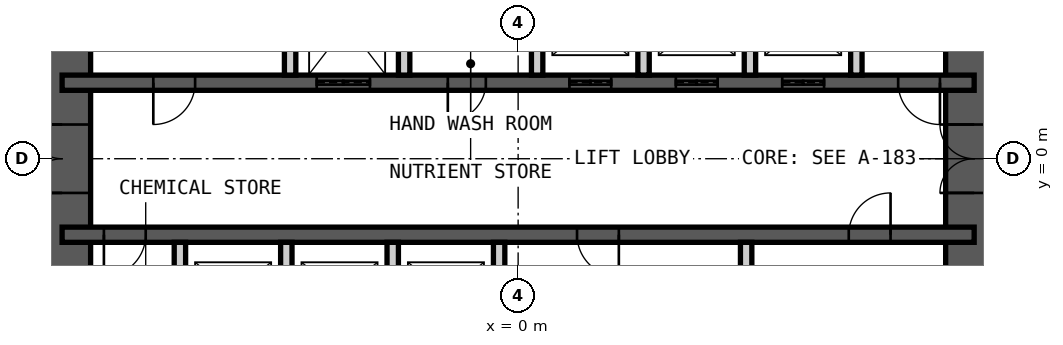
"""IFC4 building model, lengths in metres.
Left out: names, types, materials, properties, quantities, classifications, styles, units other than length and angle.
Written with IfcOpenShell. Run it as: python <this file> out.ifc"""

import sys

from ifc_helpers import new_model, si_unit, direction, frame, frame_2d, origin, place, context, subcontext, project, spatial, rectangle, extrude, element, fill, save


model = new_model("IFC4")
c1 = context("Model", 3, precision=1e-05, world=origin(), true_north=direction((0.0, 1.0)))
c2 = subcontext(c1, "Body", "Model", "MODEL_VIEW")
j1 = project(units=[si_unit("LENGTHUNIT", "METRE"), si_unit("PLANEANGLEUNIT", "RADIAN")], contexts=[c1])
p1 = place(None, origin())
s1 = spatial("IfcSite", under=j1, at=p1, CompositionType="ELEMENT")
p2 = place(p1, origin())
s2 = spatial("IfcBuilding", under=s1, at=p2, CompositionType="ELEMENT")
p3 = place(p2, frame((0.0, 0.0, 77.0)))
s3 = spatial("IfcBuildingStorey", under=s2, at=p3, CompositionType="ELEMENT", Elevation=77.0)
p4 = place(p3, frame((12.0, -9.0, 0.0), z_axis=(0.0, 0.0, 1.0), x_axis=(0.0, 1.0, 0.0)))
e1 = element("IfcWall", 1, at=p4, inside=s3, PredefinedType="SHEAR", context=c2, shape_type="SweptSolid", body=[
    extrude(rectangle(XDim=18.0, YDim=1.5, at=frame_2d((9.0, 0.0))), origin(), (0.0, 0.0, 1.0), 5.0),
])
p5 = place(p4, frame((8.1, 0.0, 0.0)))
e2 = element("IfcOpeningElement", 2, at=p5, cuts=e1, PredefinedType="OPENING", context=c2, shape_type="SweptSolid", body=[
    extrude(rectangle(XDim=1.8, YDim=2.1, at=frame_2d((0.9, 1.05))), frame((0.0, 0.76, 0.0), z_axis=(0.0, -1.0, 0.0), x_axis=(1.0, 0.0, 0.0)), (0.0, 0.0, 1.0), 1.52),
])
p6 = place(p3, frame((-12.0, -9.0, 0.0), z_axis=(0.0, 0.0, 1.0), x_axis=(0.0, 1.0, 0.0)))
e3 = element("IfcWall", 3, at=p6, inside=s3, PredefinedType="SHEAR", context=c2, shape_type="SweptSolid", body=[
    extrude(rectangle(XDim=18.0, YDim=1.5, at=frame_2d((9.0, 0.0))), origin(), (0.0, 0.0, 1.0), 5.0),
])
p7 = place(p6, frame((8.1, 0.0, 0.0)))
e4 = element("IfcOpeningElement", 4, at=p7, cuts=e3, PredefinedType="OPENING", context=c2, shape_type="SweptSolid", body=[
    extrude(rectangle(XDim=1.8, YDim=2.1, at=frame_2d((0.9, 1.05))), frame((0.0, 0.76, 0.0), z_axis=(0.0, -1.0, 0.0), x_axis=(1.0, 0.0, 0.0)), (0.0, 0.0, 1.0), 1.52),
])
p8 = place(p3, frame((-12.0, 2.0, 0.0), z_axis=(0.0, 0.0, 1.0), x_axis=(1.0, 0.0, 0.0)))
e5 = element("IfcWall", 5, at=p8, inside=s3, PredefinedType="SHEAR", context=c2, shape_type="SweptSolid", body=[
    extrude(rectangle(XDim=24.0, YDim=0.4, at=frame_2d((12.0, 0.0))), origin(), (0.0, 0.0, 1.0), 5.0),
])
p9 = place(p8, frame((2.4, 0.0, 0.0)))
e6 = element("IfcOpeningElement", 6, at=p9, cuts=e5, PredefinedType="OPENING", context=c2, shape_type="SweptSolid", body=[
    extrude(rectangle(XDim=1.1, YDim=2.1, at=frame_2d((0.55, 1.05))), frame((0.0, 0.21, 0.0), z_axis=(0.0, -1.0, 0.0), x_axis=(1.0, 0.0, 0.0)), (0.0, 0.0, 1.0), 0.42),
])
p10 = place(p8, frame((22.0, 0.0, 0.0)))
e7 = element("IfcOpeningElement", 7, at=p10, cuts=e5, PredefinedType="OPENING", context=c2, shape_type="SweptSolid", body=[
    extrude(rectangle(XDim=1.1, YDim=2.1, at=frame_2d((0.55, 1.05))), frame((0.0, 0.21, 0.0), z_axis=(0.0, -1.0, 0.0), x_axis=(1.0, 0.0, 0.0)), (0.0, 0.0, 1.0), 0.42),
])
p11 = place(p8, frame((10.15, 0.0, 0.0)))
e8 = element("IfcOpeningElement", 8, at=p11, cuts=e5, PredefinedType="OPENING", context=c2, shape_type="SweptSolid", body=[
    extrude(rectangle(XDim=1.0, YDim=2.1, at=frame_2d((0.5, 1.05))), frame((0.0, 0.21, 0.0), z_axis=(0.0, -1.0, 0.0), x_axis=(1.0, 0.0, 0.0)), (0.0, 0.0, 1.0), 0.42),
])
p12 = place(p8, frame((6.7, 0.0, 0.0)))
e9 = element("IfcOpeningElement", 9, at=p12, cuts=e5, PredefinedType="OPENING", context=c2, shape_type="SweptSolid", body=[
    extrude(rectangle(XDim=1.4, YDim=2.4, at=frame_2d((0.7, 1.2))), frame((0.0, 0.21, 0.0), z_axis=(0.0, -1.0, 0.0), x_axis=(1.0, 0.0, 0.0)), (0.0, 0.0, 1.0), 0.42),
])
p13 = place(p8, frame((13.35, 0.0, 0.0)))
e10 = element("IfcOpeningElement", 10, at=p13, cuts=e5, PredefinedType="OPENING", context=c2, shape_type="SweptSolid", body=[
    extrude(rectangle(XDim=1.1, YDim=2.4, at=frame_2d((0.55, 1.2))), frame((0.0, 0.21, 0.0), z_axis=(0.0, -1.0, 0.0), x_axis=(1.0, 0.0, 0.0)), (0.0, 0.0, 1.0), 0.42),
])
p14 = place(p8, frame((16.15, 0.0, 0.0)))
e11 = element("IfcOpeningElement", 11, at=p14, cuts=e5, PredefinedType="OPENING", context=c2, shape_type="SweptSolid", body=[
    extrude(rectangle(XDim=1.1, YDim=2.4, at=frame_2d((0.55, 1.2))), frame((0.0, 0.21, 0.0), z_axis=(0.0, -1.0, 0.0), x_axis=(1.0, 0.0, 0.0)), (0.0, 0.0, 1.0), 0.42),
])
p15 = place(p8, frame((18.95, 0.0, 0.0)))
e12 = element("IfcOpeningElement", 12, at=p15, cuts=e5, PredefinedType="OPENING", context=c2, shape_type="SweptSolid", body=[
    extrude(rectangle(XDim=1.1, YDim=2.4, at=frame_2d((0.55, 1.2))), frame((0.0, 0.21, 0.0), z_axis=(0.0, -1.0, 0.0), x_axis=(1.0, 0.0, 0.0)), (0.0, 0.0, 1.0), 0.42),
])
p16 = place(p3, frame((-12.0, -2.0, 0.0), z_axis=(0.0, 0.0, 1.0), x_axis=(1.0, 0.0, 0.0)))
e13 = element("IfcWall", 13, at=p16, inside=s3, PredefinedType="SHEAR", context=c2, shape_type="SweptSolid", body=[
    extrude(rectangle(XDim=24.0, YDim=0.4, at=frame_2d((12.0, 0.0))), origin(), (0.0, 0.0, 1.0), 5.0),
])
p17 = place(p16, frame((1.1, 0.0, 0.0)))
e14 = element("IfcOpeningElement", 14, at=p17, cuts=e13, PredefinedType="OPENING", context=c2, shape_type="SweptSolid", body=[
    extrude(rectangle(XDim=1.1, YDim=2.1, at=frame_2d((0.55, 1.05))), frame((0.0, 0.21, 0.0), z_axis=(0.0, -1.0, 0.0), x_axis=(1.0, 0.0, 0.0)), (0.0, 0.0, 1.0), 0.42),
])
p18 = place(p16, frame((13.55, 0.0, 0.0)))
e15 = element("IfcOpeningElement", 15, at=p18, cuts=e13, PredefinedType="OPENING", context=c2, shape_type="SweptSolid", body=[
    extrude(rectangle(XDim=1.1, YDim=2.1, at=frame_2d((0.55, 1.05))), frame((0.0, 0.21, 0.0), z_axis=(0.0, -1.0, 0.0), x_axis=(1.0, 0.0, 0.0)), (0.0, 0.0, 1.0), 0.42),
])
p19 = place(p16, frame((20.7, 0.0, 0.0)))
e16 = element("IfcOpeningElement", 16, at=p19, cuts=e13, PredefinedType="OPENING", context=c2, shape_type="SweptSolid", body=[
    extrude(rectangle(XDim=1.1, YDim=2.1, at=frame_2d((0.55, 1.05))), frame((0.0, 0.21, 0.0), z_axis=(0.0, -1.0, 0.0), x_axis=(1.0, 0.0, 0.0)), (0.0, 0.0, 1.0), 0.42),
])
for number, where, z_axis, x_axis in (
    (17, (-6.0, 2.2, 0.0), (0.0, 0.0, 1.0), (0.0, 1.0, 0.0)),
    (18, (-3.0, 2.2, 0.0), (0.0, 0.0, 1.0), (0.0, 1.0, 0.0)),
    (19, (0.5, 2.2, 0.0), (0.0, 0.0, 1.0), (0.0, 1.0, 0.0)),
    (20, (3.3, 2.2, 0.0), (0.0, 0.0, 1.0), (0.0, 1.0, 0.0)),
    (21, (6.1, 2.2, 0.0), (0.0, 0.0, 1.0), (0.0, 1.0, 0.0)),
    (22, (8.9, 2.2, 0.0), (0.0, 0.0, 1.0), (0.0, 1.0, 0.0)),
    (23, (-8.9, -4.85, 0.0), (0.0, 0.0, 1.0), (0.0, 1.0, 0.0)),
    (24, (-6.1, -4.85, 0.0), (0.0, 0.0, 1.0), (0.0, 1.0, 0.0)),
    (25, (-3.3, -4.85, 0.0), (0.0, 0.0, 1.0), (0.0, 1.0, 0.0)),
    (26, (-0.5, -4.85, 0.0), (0.0, 0.0, 1.0), (0.0, 1.0, 0.0)),
    (27, (6.0, -4.85, 0.0), (0.0, 0.0, 1.0), (0.0, 1.0, 0.0)),
):
    element("IfcWall", number, at=place(p3, frame(where, z_axis=z_axis, x_axis=x_axis)), inside=s3, PredefinedType="PARTITIONING", context=c2, shape_type="SweptSolid", body=[
        extrude(rectangle(XDim=2.65, YDim=0.3, at=frame_2d((1.325, 0.0))), origin(), (0.0, 0.0, 1.0), 4.78),
    ])
p20 = place(p9, origin())
e28 = element("IfcDoor", 28, at=p20, inside=s3, OperationType="SINGLE_SWING_LEFT", PredefinedType="DOOR", context=c2, shape_type="SweptSolid", body=[
    extrude(rectangle(XDim=1.1, YDim=2.1, at=frame_2d((0.55, 1.05))), frame((0.0, 0.025, 0.0), z_axis=(0.0, -1.0, 0.0), x_axis=(1.0, 0.0, 0.0)), (0.0, 0.0, 1.0), 0.05),
])
fill(e6, e28)
p21 = place(p17, origin())
e29 = element("IfcDoor", 29, at=p21, inside=s3, OperationType="SINGLE_SWING_LEFT", PredefinedType="DOOR", context=c2, shape_type="SweptSolid", body=[
    extrude(rectangle(XDim=1.1, YDim=2.1, at=frame_2d((0.55, 1.05))), frame((0.0, 0.025, 0.0), z_axis=(0.0, -1.0, 0.0), x_axis=(1.0, 0.0, 0.0)), (0.0, 0.0, 1.0), 0.05),
])
fill(e14, e29)
p22 = place(p10, origin())
e30 = element("IfcDoor", 30, at=p22, inside=s3, OperationType="SINGLE_SWING_RIGHT", PredefinedType="DOOR", context=c2, shape_type="SweptSolid", body=[
    extrude(rectangle(XDim=1.1, YDim=2.1, at=frame_2d((0.55, 1.05))), frame((0.0, 0.025, 0.0), z_axis=(0.0, -1.0, 0.0), x_axis=(1.0, 0.0, 0.0)), (0.0, 0.0, 1.0), 0.05),
])
fill(e7, e30)
p23 = place(p11, origin())
e31 = element("IfcDoor", 31, at=p23, inside=s3, OperationType="SINGLE_SWING_LEFT", PredefinedType="DOOR", context=c2, shape_type="SweptSolid", body=[
    extrude(rectangle(XDim=1.0, YDim=2.1, at=frame_2d((0.5, 1.05))), frame((0.0, 0.025, 0.0), z_axis=(0.0, -1.0, 0.0), x_axis=(1.0, 0.0, 0.0)), (0.0, 0.0, 1.0), 0.05),
])
fill(e8, e31)
p24 = place(p18, origin())
e32 = element("IfcDoor", 32, at=p24, inside=s3, OperationType="SINGLE_SWING_RIGHT", PredefinedType="DOOR", context=c2, shape_type="SweptSolid", body=[
    extrude(rectangle(XDim=1.1, YDim=2.1, at=frame_2d((0.55, 1.05))), frame((0.0, 0.025, 0.0), z_axis=(0.0, -1.0, 0.0), x_axis=(1.0, 0.0, 0.0)), (0.0, 0.0, 1.0), 0.05),
])
fill(e15, e32)
p25 = place(p19, origin())
e33 = element("IfcDoor", 33, at=p25, inside=s3, OperationType="SINGLE_SWING_LEFT", PredefinedType="DOOR", context=c2, shape_type="SweptSolid", body=[
    extrude(rectangle(XDim=1.1, YDim=2.1, at=frame_2d((0.55, 1.05))), frame((0.0, 0.025, 0.0), z_axis=(0.0, -1.0, 0.0), x_axis=(1.0, 0.0, 0.0)), (0.0, 0.0, 1.0), 0.05),
])
fill(e16, e33)
p26 = place(p5, origin())
e34 = element("IfcDoor", 34, at=p26, inside=s3, OperationType="DOUBLE_DOOR_DOUBLE_SWING", PredefinedType="DOOR", context=c2, shape_type="SweptSolid", body=[
    extrude(rectangle(XDim=1.8, YDim=2.1, at=frame_2d((0.9, 1.05))), frame((0.0, 0.025, 0.0), z_axis=(0.0, -1.0, 0.0), x_axis=(1.0, 0.0, 0.0)), (0.0, 0.0, 1.0), 0.05),
])
fill(e2, e34)
p27 = place(p7, origin())
e35 = element("IfcDoor", 35, at=p27, inside=s3, OperationType="DOUBLE_DOOR_DOUBLE_SWING", PredefinedType="DOOR", context=c2, shape_type="SweptSolid", body=[
    extrude(rectangle(XDim=1.8, YDim=2.1, at=frame_2d((0.9, 1.05))), frame((0.0, 0.025, 0.0), z_axis=(0.0, -1.0, 0.0), x_axis=(1.0, 0.0, 0.0)), (0.0, 0.0, 1.0), 0.05),
])
fill(e4, e35)
p28 = place(p12, origin())
e36 = element("IfcDoor", 36, at=p28, inside=s3, OperationType="DOUBLE_DOOR_SLIDING", PredefinedType="DOOR", context=c2, shape_type="SweptSolid", body=[
    extrude(rectangle(XDim=1.4, YDim=2.4, at=frame_2d((0.7, 1.2))), frame((0.0, 0.025, 0.0), z_axis=(0.0, -1.0, 0.0), x_axis=(1.0, 0.0, 0.0)), (0.0, 0.0, 1.0), 0.05),
])
fill(e9, e36)
p29 = place(p13, origin())
e37 = element("IfcDoor", 37, at=p29, inside=s3, OperationType="DOUBLE_DOOR_SLIDING", PredefinedType="DOOR", context=c2, shape_type="SweptSolid", body=[
    extrude(rectangle(XDim=1.1, YDim=2.4, at=frame_2d((0.55, 1.2))), frame((0.0, 0.025, 0.0), z_axis=(0.0, -1.0, 0.0), x_axis=(1.0, 0.0, 0.0)), (0.0, 0.0, 1.0), 0.05),
])
fill(e10, e37)
p30 = place(p14, origin())
e38 = element("IfcDoor", 38, at=p30, inside=s3, OperationType="DOUBLE_DOOR_SLIDING", PredefinedType="DOOR", context=c2, shape_type="SweptSolid", body=[
    extrude(rectangle(XDim=1.1, YDim=2.4, at=frame_2d((0.55, 1.2))), frame((0.0, 0.025, 0.0), z_axis=(0.0, -1.0, 0.0), x_axis=(1.0, 0.0, 0.0)), (0.0, 0.0, 1.0), 0.05),
])
fill(e11, e38)
p31 = place(p15, origin())
e39 = element("IfcDoor", 39, at=p31, inside=s3, OperationType="DOUBLE_DOOR_SLIDING", PredefinedType="DOOR", context=c2, shape_type="SweptSolid", body=[
    extrude(rectangle(XDim=1.1, YDim=2.4, at=frame_2d((0.55, 1.2))), frame((0.0, 0.025, 0.0), z_axis=(0.0, -1.0, 0.0), x_axis=(1.0, 0.0, 0.0)), (0.0, 0.0, 1.0), 0.05),
])
fill(e12, e39)
save(model, sys.argv[1])
